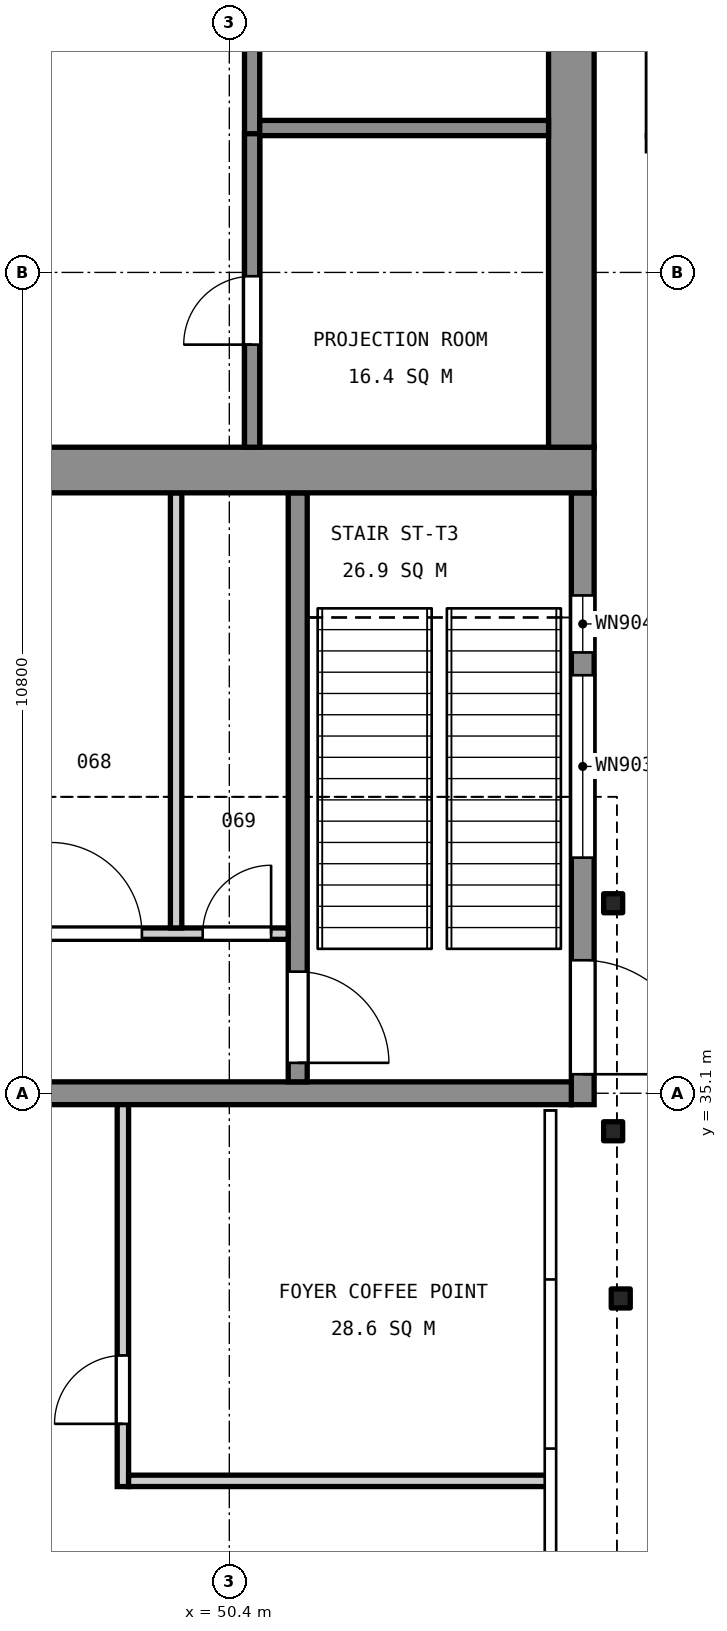
"""IFC4 building model, lengths in metres.
Left out: names, types, materials, properties, quantities, classifications, styles, units other than length and angle.
Written with IfcOpenShell. Run it as: python <this file> out.ifc"""

import sys

from ifc_helpers import new_model, si_unit, direction, frame, frame_2d, origin, origin_2d, place, context, subcontext, project, spatial, rectangle, i_section, extrude, element, fill, save


model = new_model("IFC4")
c1 = context("Model", 3, precision=1e-05, world=origin(), true_north=direction((0.0, 1.0)))
c2 = subcontext(c1, "Body", "Model", "MODEL_VIEW")
j1 = project(units=[si_unit("LENGTHUNIT", "METRE"), si_unit("PLANEANGLEUNIT", "RADIAN")], contexts=[c1])
p1 = place(None, origin())
s1 = spatial("IfcSite", under=j1, at=p1, CompositionType="ELEMENT")
p2 = place(p1, origin())
s2 = spatial("IfcBuilding", under=s1, at=p2, CompositionType="ELEMENT")
p3 = place(p2, origin())
s3 = spatial("IfcBuildingStorey", under=s2, at=p3, CompositionType="ELEMENT", Elevation=0.0)
p4 = place(p3, frame((55.05, 34.95, 0.0), z_axis=(0.0, 0.0, 1.0), x_axis=(0.0, 1.0, 0.0)))
e1 = element("IfcWall", 1, at=p4, inside=s3, PredefinedType="SOLIDWALL", context=c2, shape_type="SweptSolid", body=[
    extrude(rectangle(XDim=8.05, YDim=0.3, at=frame_2d((4.025, 0.0))), origin(), (0.0, 0.0, 1.0), 5.7),
])
p5 = place(p4, frame((0.4, 0.0, 0.0)))
e2 = element("IfcOpeningElement", 2, at=p5, cuts=e1, PredefinedType="OPENING", context=c2, shape_type="SweptSolid", body=[
    extrude(rectangle(XDim=1.5, YDim=2.4, at=frame_2d((0.75, 1.2))), frame((0.0, 0.16, 0.0), z_axis=(0.0, -1.0, 0.0), x_axis=(1.0, 0.0, 0.0)), (0.0, 0.0, 1.0), 0.32),
])
p6 = place(p4, frame((3.25, 0.0, 0.9)))
e3 = element("IfcOpeningElement", 3, at=p6, cuts=e1, PredefinedType="OPENING", context=c2, shape_type="SweptSolid", body=[
    extrude(rectangle(XDim=2.4, YDim=1.8, at=frame_2d((1.2, 0.9))), frame((0.0, 0.16, 0.0), z_axis=(0.0, -1.0, 0.0), x_axis=(1.0, 0.0, 0.0)), (0.0, 0.0, 1.0), 0.32),
])
p7 = place(p4, frame((5.95, 0.0, 0.8)))
e4 = element("IfcOpeningElement", 4, at=p7, cuts=e1, PredefinedType="OPENING", context=c2, shape_type="SweptSolid", body=[
    extrude(rectangle(XDim=0.75, YDim=1.2, at=frame_2d((0.375, 0.6))), frame((0.0, 0.16, 0.0), z_axis=(0.0, -1.0, 0.0), x_axis=(1.0, 0.0, 0.0)), (0.0, 0.0, 1.0), 0.32),
])
p8 = place(p3, frame((28.1, 35.1, 0.0), z_axis=(0.0, 0.0, 1.0), x_axis=(1.0, 0.0, 0.0)))
e5 = element("IfcWall", 5, at=p8, inside=s3, PredefinedType="SOLIDWALL", context=c2, shape_type="SweptSolid", body=[
    extrude(rectangle(XDim=26.8, YDim=0.3, at=frame_2d((13.4, 0.0))), origin(), (0.0, 0.0, 1.0), 5.7),
])
p9 = place(p8, frame((4.7, 0.0, 0.0)))
e6 = element("IfcOpeningElement", 6, at=p9, cuts=e5, PredefinedType="OPENING", context=c2, shape_type="SweptSolid", body=[
    extrude(rectangle(XDim=1.8, YDim=2.4, at=frame_2d((0.9, 1.2))), frame((0.0, 0.16, 0.0), z_axis=(0.0, -1.0, 0.0), x_axis=(1.0, 0.0, 0.0)), (0.0, 0.0, 1.0), 0.32),
])
p10 = place(p8, frame((9.0, 0.0, 0.0)))
e7 = element("IfcOpeningElement", 7, at=p10, cuts=e5, PredefinedType="OPENING", context=c2, shape_type="SweptSolid", body=[
    extrude(rectangle(XDim=1.8, YDim=2.4, at=frame_2d((0.9, 1.2))), frame((0.0, 0.16, 0.0), z_axis=(0.0, -1.0, 0.0), x_axis=(1.0, 0.0, 0.0)), (0.0, 0.0, 1.0), 0.32),
])
p11 = place(p8, frame((13.0, 0.0, 0.0)))
e8 = element("IfcOpeningElement", 8, at=p11, cuts=e5, PredefinedType="OPENING", context=c2, shape_type="SweptSolid", body=[
    extrude(rectangle(XDim=1.8, YDim=2.4, at=frame_2d((0.9, 1.2))), frame((0.0, 0.16, 0.0), z_axis=(0.0, -1.0, 0.0), x_axis=(1.0, 0.0, 0.0)), (0.0, 0.0, 1.0), 0.32),
])
p12 = place(p3, frame((51.3, 35.25, 0.0), z_axis=(0.0, 0.0, 1.0), x_axis=(0.0, 1.0, 0.0)))
e9 = element("IfcWall", 9, at=p12, inside=s3, PredefinedType="SOLIDWALL", context=c2, shape_type="SweptSolid", body=[
    extrude(rectangle(XDim=7.75, YDim=0.25, at=frame_2d((3.875, 0.0))), origin(), (0.0, 0.0, 1.0), 5.7),
])
p13 = place(p12, frame((0.25, 0.0, 0.0)))
e10 = element("IfcOpeningElement", 10, at=p13, cuts=e9, PredefinedType="OPENING", context=c2, shape_type="SweptSolid", body=[
    extrude(rectangle(XDim=1.2, YDim=2.1, at=frame_2d((0.6, 1.05))), frame((0.0, 0.135, 0.0), z_axis=(0.0, -1.0, 0.0), x_axis=(1.0, 0.0, 0.0)), (0.0, 0.0, 1.0), 0.27),
])
p14 = place(p3, frame((35.775, 37.2, 0.0), z_axis=(0.0, 0.0, 1.0), x_axis=(1.0, 0.0, 0.0)))
e11 = element("IfcWall", 11, at=p14, inside=s3, PredefinedType="SOLIDWALL", context=c2, shape_type="SweptSolid", body=[
    extrude(rectangle(XDim=15.4, YDim=0.15, at=frame_2d((7.7, 0.0))), origin(), (0.0, 0.0, 1.0), 5.7),
])
p15 = place(p14, frame((0.675, 0.0, 0.0)))
e12 = element("IfcOpeningElement", 12, at=p15, cuts=e11, PredefinedType="OPENING", context=c2, shape_type="SweptSolid", body=[
    extrude(rectangle(XDim=0.9, YDim=2.1, at=frame_2d((0.45, 1.05))), frame((0.0, 0.085, 0.0), z_axis=(0.0, -1.0, 0.0), x_axis=(1.0, 0.0, 0.0)), (0.0, 0.0, 1.0), 0.17),
])
p16 = place(p14, frame((2.775, 0.0, 0.0)))
e13 = element("IfcOpeningElement", 13, at=p16, cuts=e11, PredefinedType="OPENING", context=c2, shape_type="SweptSolid", body=[
    extrude(rectangle(XDim=0.9, YDim=2.1, at=frame_2d((0.45, 1.05))), frame((0.0, 0.085, 0.0), z_axis=(0.0, -1.0, 0.0), x_axis=(1.0, 0.0, 0.0)), (0.0, 0.0, 1.0), 0.17),
])
p17 = place(p14, frame((4.775, 0.0, 0.0)))
e14 = element("IfcOpeningElement", 14, at=p17, cuts=e11, PredefinedType="OPENING", context=c2, shape_type="SweptSolid", body=[
    extrude(rectangle(XDim=1.2, YDim=2.1, at=frame_2d((0.6, 1.05))), frame((0.0, 0.085, 0.0), z_axis=(0.0, -1.0, 0.0), x_axis=(1.0, 0.0, 0.0)), (0.0, 0.0, 1.0), 0.17),
])
p18 = place(p14, frame((6.925, 0.0, 0.0)))
e15 = element("IfcOpeningElement", 15, at=p18, cuts=e11, PredefinedType="OPENING", context=c2, shape_type="SweptSolid", body=[
    extrude(rectangle(XDim=0.9, YDim=2.1, at=frame_2d((0.45, 1.05))), frame((0.0, 0.085, 0.0), z_axis=(0.0, -1.0, 0.0), x_axis=(1.0, 0.0, 0.0)), (0.0, 0.0, 1.0), 0.17),
])
p19 = place(p14, frame((8.725, 0.0, 0.0)))
e16 = element("IfcOpeningElement", 16, at=p19, cuts=e11, PredefinedType="OPENING", context=c2, shape_type="SweptSolid", body=[
    extrude(rectangle(XDim=0.9, YDim=2.1, at=frame_2d((0.45, 1.05))), frame((0.0, 0.085, 0.0), z_axis=(0.0, -1.0, 0.0), x_axis=(1.0, 0.0, 0.0)), (0.0, 0.0, 1.0), 0.17),
])
p20 = place(p14, frame((10.575, 0.0, 0.0)))
e17 = element("IfcOpeningElement", 17, at=p20, cuts=e11, PredefinedType="OPENING", context=c2, shape_type="SweptSolid", body=[
    extrude(rectangle(XDim=0.9, YDim=2.1, at=frame_2d((0.45, 1.05))), frame((0.0, 0.085, 0.0), z_axis=(0.0, -1.0, 0.0), x_axis=(1.0, 0.0, 0.0)), (0.0, 0.0, 1.0), 0.17),
])
p21 = place(p14, frame((12.275, 0.0, 0.0)))
e18 = element("IfcOpeningElement", 18, at=p21, cuts=e11, PredefinedType="OPENING", context=c2, shape_type="SweptSolid", body=[
    extrude(rectangle(XDim=1.2, YDim=2.1, at=frame_2d((0.6, 1.05))), frame((0.0, 0.085, 0.0), z_axis=(0.0, -1.0, 0.0), x_axis=(1.0, 0.0, 0.0)), (0.0, 0.0, 1.0), 0.17),
])
p22 = place(p14, frame((14.275, 0.0, 0.0)))
e19 = element("IfcOpeningElement", 19, at=p22, cuts=e11, PredefinedType="OPENING", context=c2, shape_type="SweptSolid", body=[
    extrude(rectangle(XDim=0.9, YDim=2.1, at=frame_2d((0.45, 1.05))), frame((0.0, 0.085, 0.0), z_axis=(0.0, -1.0, 0.0), x_axis=(1.0, 0.0, 0.0)), (0.0, 0.0, 1.0), 0.17),
])
p23 = place(p3, frame((49.7, 37.275, 0.0), z_axis=(0.0, 0.0, 1.0), x_axis=(0.0, 1.0, 0.0)))
e20 = element("IfcWall", 20, at=p23, inside=s3, PredefinedType="SOLIDWALL", context=c2, shape_type="SweptSolid", body=[
    extrude(rectangle(XDim=5.725, YDim=0.15, at=frame_2d((2.863, 0.0))), origin(), (0.0, 0.0, 1.0), 5.7),
])
p24 = place(p3, frame((27.8, 43.3, 0.0), z_axis=(0.0, 0.0, 1.0), x_axis=(1.0, 0.0, 0.0)))
e21 = element("IfcWall", 21, at=p24, inside=s3, PredefinedType="SOLIDWALL", context=c2, shape_type="SweptSolid", body=[
    extrude(rectangle(XDim=27.4, YDim=0.6, at=frame_2d((13.7, 0.0))), origin(), (0.0, 0.0, 1.0), 6.0),
])
p25 = place(p24, frame((4.25, 0.0, 0.0)))
e22 = element("IfcOpeningElement", 22, at=p25, cuts=e21, PredefinedType="OPENING", context=c2, shape_type="SweptSolid", body=[
    extrude(rectangle(XDim=1.5, YDim=2.4, at=frame_2d((0.75, 1.2))), frame((0.0, 0.31, 0.0), z_axis=(0.0, -1.0, 0.0), x_axis=(1.0, 0.0, 0.0)), (0.0, 0.0, 1.0), 0.62),
])
p26 = place(p24, frame((5.95, 0.0, 0.0)))
e23 = element("IfcOpeningElement", 23, at=p26, cuts=e21, PredefinedType="OPENING", context=c2, shape_type="SweptSolid", body=[
    extrude(rectangle(XDim=1.5, YDim=2.4, at=frame_2d((0.75, 1.2))), frame((0.0, 0.31, 0.0), z_axis=(0.0, -1.0, 0.0), x_axis=(1.0, 0.0, 0.0)), (0.0, 0.0, 1.0), 0.62),
])
p27 = place(p3, frame((54.9, 43.6, 0.0), z_axis=(0.0, 0.0, 1.0), x_axis=(0.0, 1.0, 0.0)))
e24 = element("IfcWall", 24, at=p27, inside=s3, PredefinedType="SOLIDWALL", context=c2, shape_type="SweptSolid", body=[
    extrude(rectangle(XDim=21.8, YDim=0.6, at=frame_2d((10.9, 0.0))), origin(), (0.0, 0.0, 1.0), 6.0),
])
p28 = place(p3, frame((50.7, 43.6, 0.0), z_axis=(0.0, 0.0, 1.0), x_axis=(0.0, 1.0, 0.0)))
e25 = element("IfcWall", 25, at=p28, inside=s3, PredefinedType="SOLIDWALL", context=c2, shape_type="SweptSolid", body=[
    extrude(rectangle(XDim=19.775, YDim=0.2, at=frame_2d((9.887, 0.0))), origin(), (0.0, 0.0, 1.0), 2.2),
])
p29 = place(p3, frame((50.7, 43.6, 2.4), z_axis=(0.0, 0.0, 1.0), x_axis=(0.0, 1.0, 0.0)))
e26 = element("IfcWall", 26, at=p29, inside=s3, PredefinedType="SOLIDWALL", context=c2, shape_type="SweptSolid", body=[
    extrude(rectangle(XDim=4.125, YDim=0.2, at=frame_2d((2.062, 0.0))), origin(), (0.0, 0.0, 1.0), 2.5),
])
p30 = place(p29, frame((1.35, 0.0, 0.0)))
e27 = element("IfcOpeningElement", 27, at=p30, cuts=e26, PredefinedType="OPENING", context=c2, shape_type="SweptSolid", body=[
    extrude(rectangle(XDim=0.9, YDim=2.1, at=frame_2d((0.45, 1.05))), frame((0.0, 0.11, 0.0), z_axis=(0.0, -1.0, 0.0), x_axis=(1.0, 0.0, 0.0)), (0.0, 0.0, 1.0), 0.22),
])
p31 = place(p3, frame((50.8, 47.8, 2.4), z_axis=(0.0, 0.0, 1.0), x_axis=(1.0, 0.0, 0.0)))
e28 = element("IfcWall", 28, at=p31, inside=s3, PredefinedType="SOLIDWALL", context=c2, shape_type="SweptSolid", body=[
    extrude(rectangle(XDim=3.8, YDim=0.2, at=frame_2d((1.9, 0.0))), origin(), (0.0, 0.0, 1.0), 2.5),
])
p32 = place(p3, frame((49.0, 29.925, 0.0), z_axis=(0.0, 0.0, 1.0), x_axis=(0.0, 1.0, 0.0)))
e29 = element("IfcWall", 29, at=p32, inside=s3, PredefinedType="SOLIDWALL", context=c2, shape_type="SweptSolid", body=[
    extrude(rectangle(XDim=5.025, YDim=0.15, at=frame_2d((2.512, 0.0))), origin(), (0.0, 0.0, 1.0), 4.4),
])
p33 = place(p32, frame((0.825, 0.0, 0.0)))
e30 = element("IfcOpeningElement", 30, at=p33, cuts=e29, PredefinedType="OPENING", context=c2, shape_type="SweptSolid", body=[
    extrude(rectangle(XDim=0.9, YDim=2.1, at=frame_2d((0.45, 1.05))), frame((0.0, 0.085, 0.0), z_axis=(0.0, -1.0, 0.0), x_axis=(1.0, 0.0, 0.0)), (0.0, 0.0, 1.0), 0.17),
])
p34 = place(p3, frame((49.075, 30.0, 0.0), z_axis=(0.0, 0.0, 1.0), x_axis=(1.0, 0.0, 0.0)))
e31 = element("IfcWall", 31, at=p34, inside=s3, PredefinedType="SOLIDWALL", context=c2, shape_type="SweptSolid", body=[
    extrude(rectangle(XDim=5.525, YDim=0.15, at=frame_2d((2.763, 0.0))), origin(), (0.0, 0.0, 1.0), 4.4),
])
for number, where, z_axis, x_axis in (
    (32, (55.45, 34.6, 0.0), (0.0, 0.0, 1.0), (1.0, 0.0, 0.0)),
    (33, (55.45, 37.6, 0.0), (0.0, 0.0, 1.0), (1.0, 0.0, 0.0)),
    (34, (55.55, 32.4, 0.0), (0.0, 0.0, 1.0), (1.0, 0.0, 0.0)),
):
    element("IfcColumn", number, at=place(p3, frame(where, z_axis=z_axis, x_axis=x_axis)), inside=s3, PredefinedType="COLUMN", context=c2, shape_type="SweptSolid", body=[
        extrude(i_section(OverallWidth=0.25, OverallDepth=0.25, WebThickness=0.009, FlangeThickness=0.014, FilletRadius=0.016, at=origin_2d()), origin(), (0.0, 0.0, 1.0), 4.8),
    ])
p35 = place(p5, frame((1.5, 0.0, 0.0), z_axis=(0.0, 0.0, 1.0), x_axis=(-1.0, 0.0, 0.0)))
e35 = element("IfcDoor", 35, at=p35, inside=s3, OperationType="SINGLE_SWING_RIGHT", PredefinedType="DOOR", context=c2, shape_type="SweptSolid", body=[
    extrude(rectangle(XDim=1.5, YDim=2.4, at=frame_2d((0.75, 1.2))), frame((0.0, 0.025, 0.0), z_axis=(0.0, -1.0, 0.0), x_axis=(1.0, 0.0, 0.0)), (0.0, 0.0, 1.0), 0.05),
])
fill(e2, e35)
p36 = place(p13, frame((1.2, 0.0, 0.0), z_axis=(0.0, 0.0, 1.0), x_axis=(-1.0, 0.0, 0.0)))
e36 = element("IfcDoor", 36, at=p36, inside=s3, OperationType="SINGLE_SWING_RIGHT", PredefinedType="DOOR", context=c2, shape_type="SweptSolid", body=[
    extrude(rectangle(XDim=1.2, YDim=2.1, at=frame_2d((0.6, 1.05))), frame((0.0, 0.025, 0.0), z_axis=(0.0, -1.0, 0.0), x_axis=(1.0, 0.0, 0.0)), (0.0, 0.0, 1.0), 0.05),
])
fill(e10, e36)
p37 = place(p30, origin())
e37 = element("IfcDoor", 37, at=p37, inside=s3, OperationType="SINGLE_SWING_LEFT", PredefinedType="DOOR", context=c2, shape_type="SweptSolid", body=[
    extrude(rectangle(XDim=0.9, YDim=2.1, at=frame_2d((0.45, 1.05))), frame((0.0, 0.025, 0.0), z_axis=(0.0, -1.0, 0.0), x_axis=(1.0, 0.0, 0.0)), (0.0, 0.0, 1.0), 0.05),
])
fill(e27, e37)
p38 = place(p21, origin())
e38 = element("IfcDoor", 38, at=p38, inside=s3, OperationType="SINGLE_SWING_LEFT", PredefinedType="DOOR", context=c2, shape_type="SweptSolid", body=[
    extrude(rectangle(XDim=1.2, YDim=2.1, at=frame_2d((0.6, 1.05))), frame((0.0, 0.025, 0.0), z_axis=(0.0, -1.0, 0.0), x_axis=(1.0, 0.0, 0.0)), (0.0, 0.0, 1.0), 0.05),
])
fill(e18, e38)
p39 = place(p22, origin())
e39 = element("IfcDoor", 39, at=p39, inside=s3, OperationType="SINGLE_SWING_RIGHT", PredefinedType="DOOR", context=c2, shape_type="SweptSolid", body=[
    extrude(rectangle(XDim=0.9, YDim=2.1, at=frame_2d((0.45, 1.05))), frame((0.0, 0.025, 0.0), z_axis=(0.0, -1.0, 0.0), x_axis=(1.0, 0.0, 0.0)), (0.0, 0.0, 1.0), 0.05),
])
fill(e19, e39)
p40 = place(p6, origin())
e40 = element("IfcWindow", 40, at=p40, inside=s3, PartitioningType="SINGLE_PANEL", PredefinedType="WINDOW", context=c2, shape_type="SweptSolid", body=[
    extrude(rectangle(XDim=2.4, YDim=1.8, at=frame_2d((1.2, 0.9))), frame((0.0, 0.03, 0.0), z_axis=(0.0, -1.0, 0.0), x_axis=(1.0, 0.0, 0.0)), (0.0, 0.0, 1.0), 0.06),
])
fill(e3, e40)
p41 = place(p7, origin())
e41 = element("IfcWindow", 41, at=p41, inside=s3, PartitioningType="SINGLE_PANEL", PredefinedType="WINDOW", context=c2, shape_type="SweptSolid", body=[
    extrude(rectangle(XDim=0.75, YDim=1.2, at=frame_2d((0.375, 0.6))), frame((0.0, 0.03, 0.0), z_axis=(0.0, -1.0, 0.0), x_axis=(1.0, 0.0, 0.0)), (0.0, 0.0, 1.0), 0.06),
])
fill(e4, e41)
p42 = place(p33, origin())
e42 = element("IfcDoor", 42, at=p42, inside=s3, OperationType="SINGLE_SWING_LEFT", PredefinedType="DOOR", context=c2, shape_type="SweptSolid", body=[
    extrude(rectangle(XDim=0.9, YDim=2.1, at=frame_2d((0.45, 1.05))), frame((0.0, 0.025, 0.0), z_axis=(0.0, -1.0, 0.0), x_axis=(1.0, 0.0, 0.0)), (0.0, 0.0, 1.0), 0.05),
])
fill(e30, e42)
save(model, sys.argv[1])
